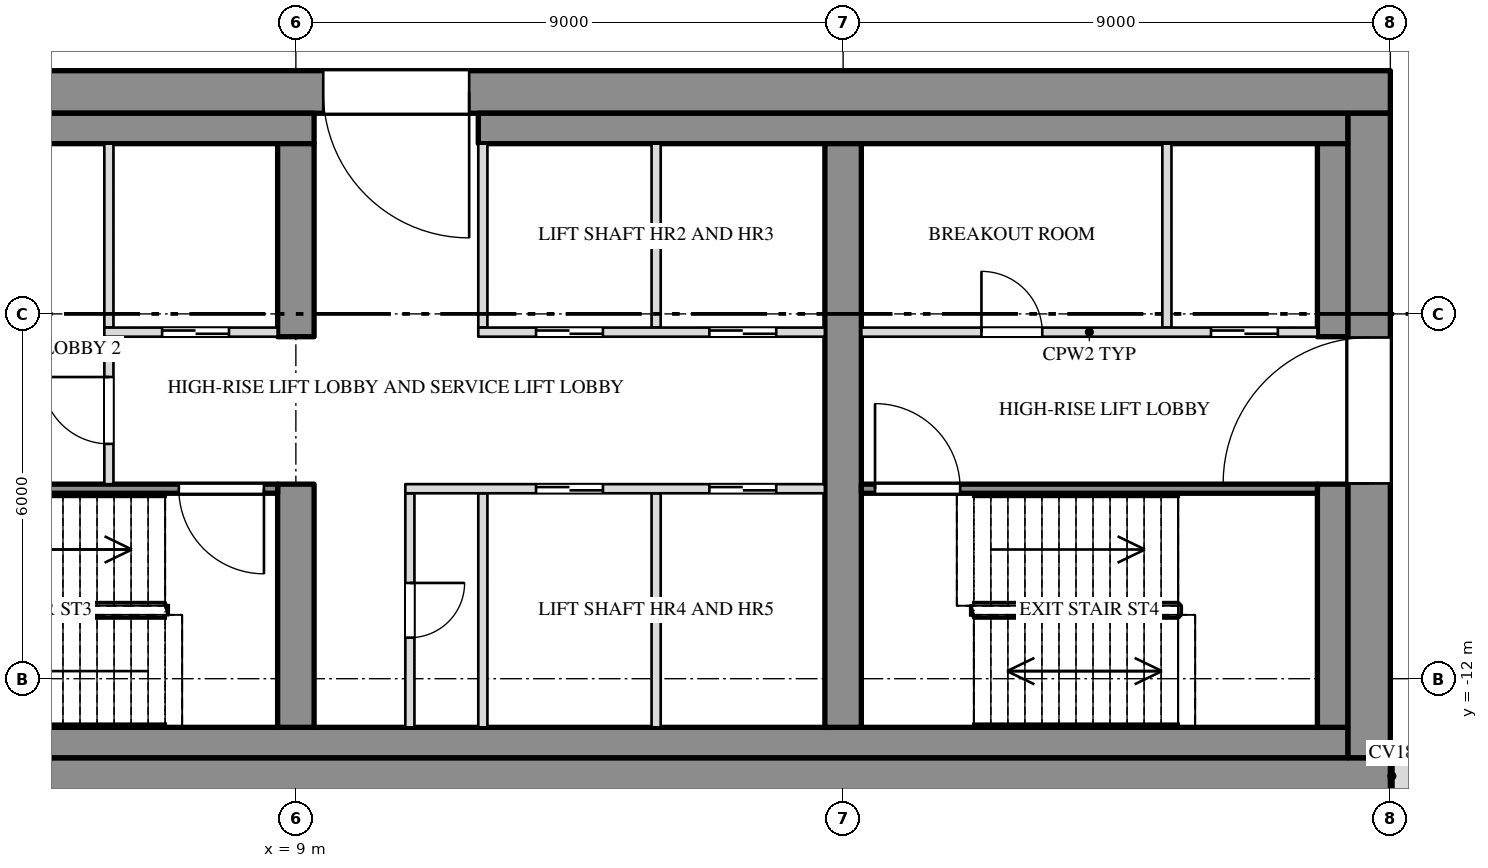
"""IFC4 building model, lengths in metres.
Left out: names, types, materials, properties, quantities, classifications, styles, units other than length and angle.
Written with IfcOpenShell. Run it as: python <this file> out.ifc"""

import sys

from ifc_helpers import new_model, si_unit, direction, frame, frame_2d, origin, place, context, subcontext, project, spatial, rectangle, extrude, element, fill, save


model = new_model("IFC4")
c1 = context("Model", 3, precision=1e-05, world=origin(), true_north=direction((0.0, 1.0)))
c2 = subcontext(c1, "Body", "Model", "MODEL_VIEW")
j1 = project(units=[si_unit("LENGTHUNIT", "METRE"), si_unit("PLANEANGLEUNIT", "RADIAN")], contexts=[c1])
p1 = place(None, origin())
s1 = spatial("IfcSite", under=j1, at=p1, CompositionType="ELEMENT")
p2 = place(p1, origin())
s2 = spatial("IfcBuilding", under=s1, at=p2, CompositionType="ELEMENT")
p3 = place(p2, frame((0.0, 0.0, 256.5)))
s3 = spatial("IfcBuildingStorey", under=s2, at=p3, CompositionType="ELEMENT", Elevation=256.5)
p4 = place(p3, frame((-27.0, -2.35, 0.0), z_axis=(0.0, 0.0, 1.0), x_axis=(1.0, 0.0, 0.0)))
e1 = element("IfcWall", 1, at=p4, inside=s3, PredefinedType="SHEAR", context=c2, shape_type="SweptSolid", body=[
    extrude(rectangle(XDim=54.0, YDim=0.7, at=frame_2d((27.0, 0.0))), origin(), (0.0, 0.0, 1.0), 3.8),
])
p5 = place(p4, frame((15.15, 0.0, 0.0)))
e2 = element("IfcOpeningElement", 2, at=p5, cuts=e1, PredefinedType="OPENING", context=c2, shape_type="SweptSolid", body=[
    extrude(rectangle(XDim=2.4, YDim=2.1, at=frame_2d((1.2, 1.05))), frame((0.0, 0.362, 0.0), z_axis=(0.0, -1.0, 0.0), x_axis=(1.0, 0.0, 0.0)), (0.0, 0.0, 1.0), 0.724),
])
p6 = place(p4, frame((36.45, 0.0, 0.0)))
e3 = element("IfcOpeningElement", 3, at=p6, cuts=e1, PredefinedType="OPENING", context=c2, shape_type="SweptSolid", body=[
    extrude(rectangle(XDim=2.4, YDim=2.1, at=frame_2d((1.2, 1.05))), frame((0.0, 0.362, 0.0), z_axis=(0.0, -1.0, 0.0), x_axis=(1.0, 0.0, 0.0)), (0.0, 0.0, 1.0), 0.724),
])
p7 = place(p3, frame((-27.0, -13.65, 0.0), z_axis=(0.0, 0.0, 1.0), x_axis=(1.0, 0.0, 0.0)))
e4 = element("IfcWall", 4, at=p7, inside=s3, PredefinedType="SHEAR", context=c2, shape_type="SweptSolid", body=[
    extrude(rectangle(XDim=54.0, YDim=0.7, at=frame_2d((27.0, 0.0))), origin(), (0.0, 0.0, 1.0), 3.8),
])
p8 = place(p3, frame((26.65, -13.3, 0.0), z_axis=(0.0, 0.0, 1.0), x_axis=(0.0, 1.0, 0.0)))
e5 = element("IfcWall", 5, at=p8, inside=s3, PredefinedType="SHEAR", context=c2, shape_type="SweptSolid", body=[
    extrude(rectangle(XDim=10.6, YDim=0.7, at=frame_2d((5.3, 0.0))), origin(), (0.0, 0.0, 1.0), 3.8),
])
p9 = place(p8, frame((4.512, 0.0, 0.0)))
e6 = element("IfcOpeningElement", 6, at=p9, cuts=e5, PredefinedType="OPENING", context=c2, shape_type="SweptSolid", body=[
    extrude(rectangle(XDim=2.4, YDim=2.1, at=frame_2d((1.2, 1.05))), frame((0.0, 0.362, 0.0), z_axis=(0.0, -1.0, 0.0), x_axis=(1.0, 0.0, 0.0)), (0.0, 0.0, 1.0), 0.724),
])
p10 = place(p3, frame((-9.3, -2.95, 0.0), z_axis=(0.0, 0.0, 1.0), x_axis=(1.0, 0.0, 0.0)))
e7 = element("IfcWall", 7, at=p10, inside=s3, PredefinedType="SHEAR", context=c2, shape_type="SweptSolid", body=[
    extrude(rectangle(XDim=18.6, YDim=0.5, at=frame_2d((9.3, 0.0))), origin(), (0.0, 0.0, 1.0), 3.8),
])
p11 = place(p3, frame((12.0, -2.95, 0.0), z_axis=(0.0, 0.0, 1.0), x_axis=(1.0, 0.0, 0.0)))
e8 = element("IfcWall", 8, at=p11, inside=s3, PredefinedType="SHEAR", context=c2, shape_type="SweptSolid", body=[
    extrude(rectangle(XDim=14.3, YDim=0.5, at=frame_2d((7.15, 0.0))), origin(), (0.0, 0.0, 1.0), 3.8),
])
p12 = place(p3, frame((-26.3, -13.05, 0.0), z_axis=(0.0, 0.0, 1.0), x_axis=(1.0, 0.0, 0.0)))
e9 = element("IfcWall", 9, at=p12, inside=s3, PredefinedType="SHEAR", context=c2, shape_type="SweptSolid", body=[
    extrude(rectangle(XDim=52.6, YDim=0.5, at=frame_2d((26.3, 0.0))), origin(), (0.0, 0.0, 1.0), 3.8),
])
p13 = place(p3, frame((26.05, -12.8, 0.0), z_axis=(0.0, 0.0, 1.0), x_axis=(0.0, 1.0, 0.0)))
e10 = element("IfcWall", 10, at=p13, inside=s3, PredefinedType="SHEAR", context=c2, shape_type="SweptSolid", body=[
    extrude(rectangle(XDim=4.0, YDim=0.5, at=frame_2d((2.0, 0.0))), origin(), (0.0, 0.0, 1.0), 3.8),
])
p14 = place(p3, frame((26.05, -6.375, 0.0), z_axis=(0.0, 0.0, 1.0), x_axis=(0.0, 1.0, 0.0)))
e11 = element("IfcWall", 11, at=p14, inside=s3, PredefinedType="SHEAR", context=c2, shape_type="SweptSolid", body=[
    extrude(rectangle(XDim=3.175, YDim=0.5, at=frame_2d((1.587, 0.0))), origin(), (0.0, 0.0, 1.0), 3.8),
])
p15 = place(p3, frame((9.0, -12.8, 0.0), z_axis=(0.0, 0.0, 1.0), x_axis=(0.0, 1.0, 0.0)))
e12 = element("IfcWall", 12, at=p15, inside=s3, PredefinedType="SHEAR", context=c2, shape_type="SweptSolid", body=[
    extrude(rectangle(XDim=4.0, YDim=0.6, at=frame_2d((2.0, 0.0))), origin(), (0.0, 0.0, 1.0), 3.8),
])
p16 = place(p3, frame((9.0, -6.375, 0.0), z_axis=(0.0, 0.0, 1.0), x_axis=(0.0, 1.0, 0.0)))
e13 = element("IfcWall", 13, at=p16, inside=s3, PredefinedType="SHEAR", context=c2, shape_type="SweptSolid", body=[
    extrude(rectangle(XDim=3.175, YDim=0.6, at=frame_2d((1.587, 0.0))), origin(), (0.0, 0.0, 1.0), 3.8),
])
p17 = place(p3, frame((18.0, -12.8, 0.0), z_axis=(0.0, 0.0, 1.0), x_axis=(0.0, 1.0, 0.0)))
e14 = element("IfcWall", 14, at=p17, inside=s3, PredefinedType="SHEAR", context=c2, shape_type="SweptSolid", body=[
    extrude(rectangle(XDim=9.6, YDim=0.6, at=frame_2d((4.8, 0.0))), origin(), (0.0, 0.0, 1.0), 3.8),
])
p18 = place(p3, frame((27.05, -13.6, 0.0), z_axis=(0.0, 0.0, 1.0), x_axis=(1.0, 0.0, 0.0)))
e15 = element("IfcWall", 15, at=p18, inside=s3, PredefinedType="SOLIDWALL", context=c2, shape_type="SweptSolid", body=[
    extrude(rectangle(XDim=2.897, YDim=0.8, at=frame_2d((1.449, 0.0))), origin(), (0.0, 0.0, 1.0), 3.8),
])
for number, where, z_axis, x_axis in (
    (16, (5.925, -6.225, 0.0), (0.0, 0.0, 1.0), (0.0, 1.0, 0.0)),
    (17, (12.075, -6.225, 0.0), (0.0, 0.0, 1.0), (0.0, 1.0, 0.0)),
    (18, (14.925, -6.225, 0.0), (0.0, 0.0, 1.0), (0.0, 1.0, 0.0)),
    (19, (23.325, -6.225, 0.0), (0.0, 0.0, 1.0), (0.0, 1.0, 0.0)),
):
    element("IfcWall", number, at=place(p3, frame(where, z_axis=z_axis, x_axis=x_axis)), inside=s3, PredefinedType="PARTITIONING", context=c2, shape_type="SweptSolid", body=[
        extrude(rectangle(XDim=3.025, YDim=0.15, at=frame_2d((1.513, 0.0))), origin(), (0.0, 0.0, 1.0), 3.8),
    ])
p19 = place(p3, frame((10.875, -12.8, 0.0), z_axis=(0.0, 0.0, 1.0), x_axis=(0.0, 1.0, 0.0)))
e20 = element("IfcWall", 20, at=p19, inside=s3, PredefinedType="PARTITIONING", context=c2, shape_type="SweptSolid", body=[
    extrude(rectangle(XDim=3.85, YDim=0.15, at=frame_2d((1.925, 0.0))), origin(), (0.0, 0.0, 1.0), 3.8),
])
p20 = place(p19, frame((1.475, 0.0, 0.0)))
e21 = element("IfcOpeningElement", 21, at=p20, cuts=e20, PredefinedType="OPENING", context=c2, shape_type="SweptSolid", body=[
    extrude(rectangle(XDim=0.9, YDim=2.1, at=frame_2d((0.45, 1.05))), frame((0.0, 0.087, 0.0), z_axis=(0.0, -1.0, 0.0), x_axis=(1.0, 0.0, 0.0)), (0.0, 0.0, 1.0), 0.174),
])
for number, where, z_axis, x_axis in (
    (22, (12.075, -12.8, 0.0), (0.0, 0.0, 1.0), (0.0, 1.0, 0.0)),
    (23, (14.925, -12.8, 0.0), (0.0, 0.0, 1.0), (0.0, 1.0, 0.0)),
):
    element("IfcWall", number, at=place(p3, frame(where, z_axis=z_axis, x_axis=x_axis)), inside=s3, PredefinedType="PARTITIONING", context=c2, shape_type="SweptSolid", body=[
        extrude(rectangle(XDim=3.85, YDim=0.15, at=frame_2d((1.925, 0.0))), origin(), (0.0, 0.0, 1.0), 3.8),
    ])
p21 = place(p3, frame((5.925, -8.8, 0.0), z_axis=(0.0, 0.0, 1.0), x_axis=(0.0, 1.0, 0.0)))
e24 = element("IfcWall", 24, at=p21, inside=s3, PredefinedType="PARTITIONING", context=c2, shape_type="SweptSolid", body=[
    extrude(rectangle(XDim=2.425, YDim=0.15, at=frame_2d((1.212, 0.0))), origin(), (0.0, 0.0, 1.0), 3.8),
])
p22 = place(p21, frame((0.662, 0.0, 0.0)))
e25 = element("IfcOpeningElement", 25, at=p22, cuts=e24, PredefinedType="OPENING", context=c2, shape_type="SweptSolid", body=[
    extrude(rectangle(XDim=1.1, YDim=2.1, at=frame_2d((0.55, 1.05))), frame((0.0, 0.087, 0.0), z_axis=(0.0, -1.0, 0.0), x_axis=(1.0, 0.0, 0.0)), (0.0, 0.0, 1.0), 0.174),
])
p23 = place(p3, frame((5.85, -6.3, 0.0), z_axis=(0.0, 0.0, 1.0), x_axis=(1.0, 0.0, 0.0)))
e26 = element("IfcWall", 26, at=p23, inside=s3, PredefinedType="PARTITIONING", context=c2, shape_type="SweptSolid", body=[
    extrude(rectangle(XDim=2.85, YDim=0.15, at=frame_2d((1.425, 0.0))), origin(), (0.0, 0.0, 1.0), 3.8),
])
p24 = place(p23, frame((0.95, 0.0, 0.0)))
e27 = element("IfcOpeningElement", 27, at=p24, cuts=e26, PredefinedType="OPENING", context=c2, shape_type="SweptSolid", body=[
    extrude(rectangle(XDim=1.1, YDim=2.1, at=frame_2d((0.55, 1.05))), frame((0.0, 0.087, 0.0), z_axis=(0.0, -1.0, 0.0), x_axis=(1.0, 0.0, 0.0)), (0.0, 0.0, 1.0), 0.174),
])
p25 = place(p3, frame((12.0, -6.3, 0.0), z_axis=(0.0, 0.0, 1.0), x_axis=(1.0, 0.0, 0.0)))
e28 = element("IfcWall", 28, at=p25, inside=s3, PredefinedType="PARTITIONING", context=c2, shape_type="SweptSolid", body=[
    extrude(rectangle(XDim=5.7, YDim=0.15, at=frame_2d((2.85, 0.0))), origin(), (0.0, 0.0, 1.0), 3.8),
])
p26 = place(p25, frame((0.95, 0.0, 0.0)))
e29 = element("IfcOpeningElement", 29, at=p26, cuts=e28, PredefinedType="OPENING", context=c2, shape_type="SweptSolid", body=[
    extrude(rectangle(XDim=1.1, YDim=2.1, at=frame_2d((0.55, 1.05))), frame((0.0, 0.087, 0.0), z_axis=(0.0, -1.0, 0.0), x_axis=(1.0, 0.0, 0.0)), (0.0, 0.0, 1.0), 0.174),
])
p27 = place(p25, frame((3.8, 0.0, 0.0)))
e30 = element("IfcOpeningElement", 30, at=p27, cuts=e28, PredefinedType="OPENING", context=c2, shape_type="SweptSolid", body=[
    extrude(rectangle(XDim=1.1, YDim=2.1, at=frame_2d((0.55, 1.05))), frame((0.0, 0.087, 0.0), z_axis=(0.0, -1.0, 0.0), x_axis=(1.0, 0.0, 0.0)), (0.0, 0.0, 1.0), 0.174),
])
p28 = place(p3, frame((18.3, -6.3, 0.0), z_axis=(0.0, 0.0, 1.0), x_axis=(1.0, 0.0, 0.0)))
e31 = element("IfcWall", 31, at=p28, inside=s3, PredefinedType="PARTITIONING", context=c2, shape_type="SweptSolid", body=[
    extrude(rectangle(XDim=7.5, YDim=0.15, at=frame_2d((3.75, 0.0))), origin(), (0.0, 0.0, 1.0), 3.8),
])
p29 = place(p28, frame((1.975, 0.0, 0.0)))
e32 = element("IfcOpeningElement", 32, at=p29, cuts=e31, PredefinedType="OPENING", context=c2, shape_type="SweptSolid", body=[
    extrude(rectangle(XDim=1.0, YDim=2.1, at=frame_2d((0.5, 1.05))), frame((0.0, 0.087, 0.0), z_axis=(0.0, -1.0, 0.0), x_axis=(1.0, 0.0, 0.0)), (0.0, 0.0, 1.0), 0.174),
])
p30 = place(p28, frame((5.75, 0.0, 0.0)))
e33 = element("IfcOpeningElement", 33, at=p30, cuts=e31, PredefinedType="OPENING", context=c2, shape_type="SweptSolid", body=[
    extrude(rectangle(XDim=1.1, YDim=2.1, at=frame_2d((0.55, 1.05))), frame((0.0, 0.087, 0.0), z_axis=(0.0, -1.0, 0.0), x_axis=(1.0, 0.0, 0.0)), (0.0, 0.0, 1.0), 0.174),
])
p31 = place(p3, frame((0.3, -8.875, 0.0), z_axis=(0.0, 0.0, 1.0), x_axis=(1.0, 0.0, 0.0)))
e34 = element("IfcWall", 34, at=p31, inside=s3, PredefinedType="SHEAR", context=c2, shape_type="SweptSolid", body=[
    extrude(rectangle(XDim=8.4, YDim=0.15, at=frame_2d((4.2, 0.0))), origin(), (0.0, 0.0, 1.0), 3.8),
])
p32 = place(p31, frame((6.775, 0.0, 0.0)))
e35 = element("IfcOpeningElement", 35, at=p32, cuts=e34, PredefinedType="OPENING", context=c2, shape_type="SweptSolid", body=[
    extrude(rectangle(XDim=1.4, YDim=2.1, at=frame_2d((0.7, 1.05))), frame((0.0, 0.087, 0.0), z_axis=(0.0, -1.0, 0.0), x_axis=(1.0, 0.0, 0.0)), (0.0, 0.0, 1.0), 0.174),
])
p33 = place(p3, frame((10.8, -8.875, 0.0), z_axis=(0.0, 0.0, 1.0), x_axis=(1.0, 0.0, 0.0)))
e36 = element("IfcWall", 36, at=p33, inside=s3, PredefinedType="PARTITIONING", context=c2, shape_type="SweptSolid", body=[
    extrude(rectangle(XDim=6.9, YDim=0.15, at=frame_2d((3.45, 0.0))), origin(), (0.0, 0.0, 1.0), 3.8),
])
p34 = place(p33, frame((2.15, 0.0, 0.0)))
e37 = element("IfcOpeningElement", 37, at=p34, cuts=e36, PredefinedType="OPENING", context=c2, shape_type="SweptSolid", body=[
    extrude(rectangle(XDim=1.1, YDim=2.1, at=frame_2d((0.55, 1.05))), frame((0.0, 0.087, 0.0), z_axis=(0.0, -1.0, 0.0), x_axis=(1.0, 0.0, 0.0)), (0.0, 0.0, 1.0), 0.174),
])
p35 = place(p33, frame((5.0, 0.0, 0.0)))
e38 = element("IfcOpeningElement", 38, at=p35, cuts=e36, PredefinedType="OPENING", context=c2, shape_type="SweptSolid", body=[
    extrude(rectangle(XDim=1.1, YDim=2.1, at=frame_2d((0.55, 1.05))), frame((0.0, 0.087, 0.0), z_axis=(0.0, -1.0, 0.0), x_axis=(1.0, 0.0, 0.0)), (0.0, 0.0, 1.0), 0.174),
])
p36 = place(p3, frame((18.3, -8.875, 0.0), z_axis=(0.0, 0.0, 1.0), x_axis=(1.0, 0.0, 0.0)))
e39 = element("IfcWall", 39, at=p36, inside=s3, PredefinedType="SHEAR", context=c2, shape_type="SweptSolid", body=[
    extrude(rectangle(XDim=7.5, YDim=0.15, at=frame_2d((3.75, 0.0))), origin(), (0.0, 0.0, 1.0), 3.8),
])
p37 = place(p36, frame((0.225, 0.0, 0.0)))
e40 = element("IfcOpeningElement", 40, at=p37, cuts=e39, PredefinedType="OPENING", context=c2, shape_type="SweptSolid", body=[
    extrude(rectangle(XDim=1.4, YDim=2.1, at=frame_2d((0.7, 1.05))), frame((0.0, 0.087, 0.0), z_axis=(0.0, -1.0, 0.0), x_axis=(1.0, 0.0, 0.0)), (0.0, 0.0, 1.0), 0.174),
])
p38 = place(p22, origin())
e41 = element("IfcDoor", 41, at=p38, inside=s3, OperationType="SINGLE_SWING_RIGHT", PredefinedType="DOOR", context=c2, shape_type="SweptSolid", body=[
    extrude(rectangle(XDim=1.1, YDim=2.1, at=frame_2d((0.55, 1.05))), frame((0.0, 0.025, 0.0), z_axis=(0.0, -1.0, 0.0), x_axis=(1.0, 0.0, 0.0)), (0.0, 0.0, 1.0), 0.05),
])
fill(e25, e41)
p39 = place(p24, origin())
e42 = element("IfcDoor", 42, at=p39, inside=s3, OperationType="SLIDING_TO_RIGHT", PredefinedType="DOOR", context=c2, shape_type="SweptSolid", body=[
    extrude(rectangle(XDim=1.1, YDim=2.1, at=frame_2d((0.55, 1.05))), frame((0.0, 0.025, 0.0), z_axis=(0.0, -1.0, 0.0), x_axis=(1.0, 0.0, 0.0)), (0.0, 0.0, 1.0), 0.05),
])
fill(e27, e42)
p40 = place(p32, origin())
e43 = element("IfcDoor", 43, at=p40, inside=s3, OperationType="DOUBLE_DOOR_SINGLE_SWING", PredefinedType="DOOR", context=c2, shape_type="SweptSolid", body=[
    extrude(rectangle(XDim=1.4, YDim=2.1, at=frame_2d((0.7, 1.05))), frame((0.0, 0.025, 0.0), z_axis=(0.0, -1.0, 0.0), x_axis=(1.0, 0.0, 0.0)), (0.0, 0.0, 1.0), 0.05),
])
fill(e35, e43)
p41 = place(p6, origin())
e44 = element("IfcDoor", 44, at=p41, inside=s3, OperationType="DOUBLE_DOOR_SINGLE_SWING", PredefinedType="DOOR", context=c2, shape_type="SweptSolid", body=[
    extrude(rectangle(XDim=2.4, YDim=2.1, at=frame_2d((1.2, 1.05))), frame((0.0, 0.025, 0.0), z_axis=(0.0, -1.0, 0.0), x_axis=(1.0, 0.0, 0.0)), (0.0, 0.0, 1.0), 0.05),
])
fill(e3, e44)
p42 = place(p20, origin())
e45 = element("IfcDoor", 45, at=p42, inside=s3, OperationType="SINGLE_SWING_LEFT", PredefinedType="DOOR", context=c2, shape_type="SweptSolid", body=[
    extrude(rectangle(XDim=0.9, YDim=2.1, at=frame_2d((0.45, 1.05))), frame((0.0, 0.025, 0.0), z_axis=(0.0, -1.0, 0.0), x_axis=(1.0, 0.0, 0.0)), (0.0, 0.0, 1.0), 0.05),
])
fill(e21, e45)
p43 = place(p34, origin())
e46 = element("IfcDoor", 46, at=p43, inside=s3, OperationType="SLIDING_TO_RIGHT", PredefinedType="DOOR", context=c2, shape_type="SweptSolid", body=[
    extrude(rectangle(XDim=1.1, YDim=2.1, at=frame_2d((0.55, 1.05))), frame((0.0, 0.025, 0.0), z_axis=(0.0, -1.0, 0.0), x_axis=(1.0, 0.0, 0.0)), (0.0, 0.0, 1.0), 0.05),
])
fill(e37, e46)
p44 = place(p26, origin())
e47 = element("IfcDoor", 47, at=p44, inside=s3, OperationType="SLIDING_TO_LEFT", PredefinedType="DOOR", context=c2, shape_type="SweptSolid", body=[
    extrude(rectangle(XDim=1.1, YDim=2.1, at=frame_2d((0.55, 1.05))), frame((0.0, 0.025, 0.0), z_axis=(0.0, -1.0, 0.0), x_axis=(1.0, 0.0, 0.0)), (0.0, 0.0, 1.0), 0.05),
])
fill(e29, e47)
p45 = place(p35, origin())
e48 = element("IfcDoor", 48, at=p45, inside=s3, OperationType="SLIDING_TO_RIGHT", PredefinedType="DOOR", context=c2, shape_type="SweptSolid", body=[
    extrude(rectangle(XDim=1.1, YDim=2.1, at=frame_2d((0.55, 1.05))), frame((0.0, 0.025, 0.0), z_axis=(0.0, -1.0, 0.0), x_axis=(1.0, 0.0, 0.0)), (0.0, 0.0, 1.0), 0.05),
])
fill(e38, e48)
p46 = place(p27, origin())
e49 = element("IfcDoor", 49, at=p46, inside=s3, OperationType="SLIDING_TO_LEFT", PredefinedType="DOOR", context=c2, shape_type="SweptSolid", body=[
    extrude(rectangle(XDim=1.1, YDim=2.1, at=frame_2d((0.55, 1.05))), frame((0.0, 0.025, 0.0), z_axis=(0.0, -1.0, 0.0), x_axis=(1.0, 0.0, 0.0)), (0.0, 0.0, 1.0), 0.05),
])
fill(e30, e49)
p47 = place(p37, origin())
e50 = element("IfcDoor", 50, at=p47, inside=s3, OperationType="DOUBLE_DOOR_SINGLE_SWING", PredefinedType="DOOR", context=c2, shape_type="SweptSolid", body=[
    extrude(rectangle(XDim=1.4, YDim=2.1, at=frame_2d((0.7, 1.05))), frame((0.0, 0.025, 0.0), z_axis=(0.0, -1.0, 0.0), x_axis=(1.0, 0.0, 0.0)), (0.0, 0.0, 1.0), 0.05),
])
fill(e40, e50)
p48 = place(p29, origin())
e51 = element("IfcDoor", 51, at=p48, inside=s3, OperationType="SINGLE_SWING_LEFT", PredefinedType="DOOR", context=c2, shape_type="SweptSolid", body=[
    extrude(rectangle(XDim=1.0, YDim=2.1, at=frame_2d((0.5, 1.05))), frame((0.0, 0.025, 0.0), z_axis=(0.0, -1.0, 0.0), x_axis=(1.0, 0.0, 0.0)), (0.0, 0.0, 1.0), 0.05),
])
fill(e32, e51)
p49 = place(p30, origin())
e52 = element("IfcDoor", 52, at=p49, inside=s3, OperationType="SLIDING_TO_RIGHT", PredefinedType="DOOR", context=c2, shape_type="SweptSolid", body=[
    extrude(rectangle(XDim=1.1, YDim=2.1, at=frame_2d((0.55, 1.05))), frame((0.0, 0.025, 0.0), z_axis=(0.0, -1.0, 0.0), x_axis=(1.0, 0.0, 0.0)), (0.0, 0.0, 1.0), 0.05),
])
fill(e33, e52)
p50 = place(p9, origin())
e53 = element("IfcDoor", 53, at=p50, inside=s3, OperationType="DOUBLE_DOOR_SINGLE_SWING", PredefinedType="DOOR", context=c2, shape_type="SweptSolid", body=[
    extrude(rectangle(XDim=2.4, YDim=2.1, at=frame_2d((1.2, 1.05))), frame((0.0, 0.025, 0.0), z_axis=(0.0, -1.0, 0.0), x_axis=(1.0, 0.0, 0.0)), (0.0, 0.0, 1.0), 0.05),
])
fill(e6, e53)
save(model, sys.argv[1])
